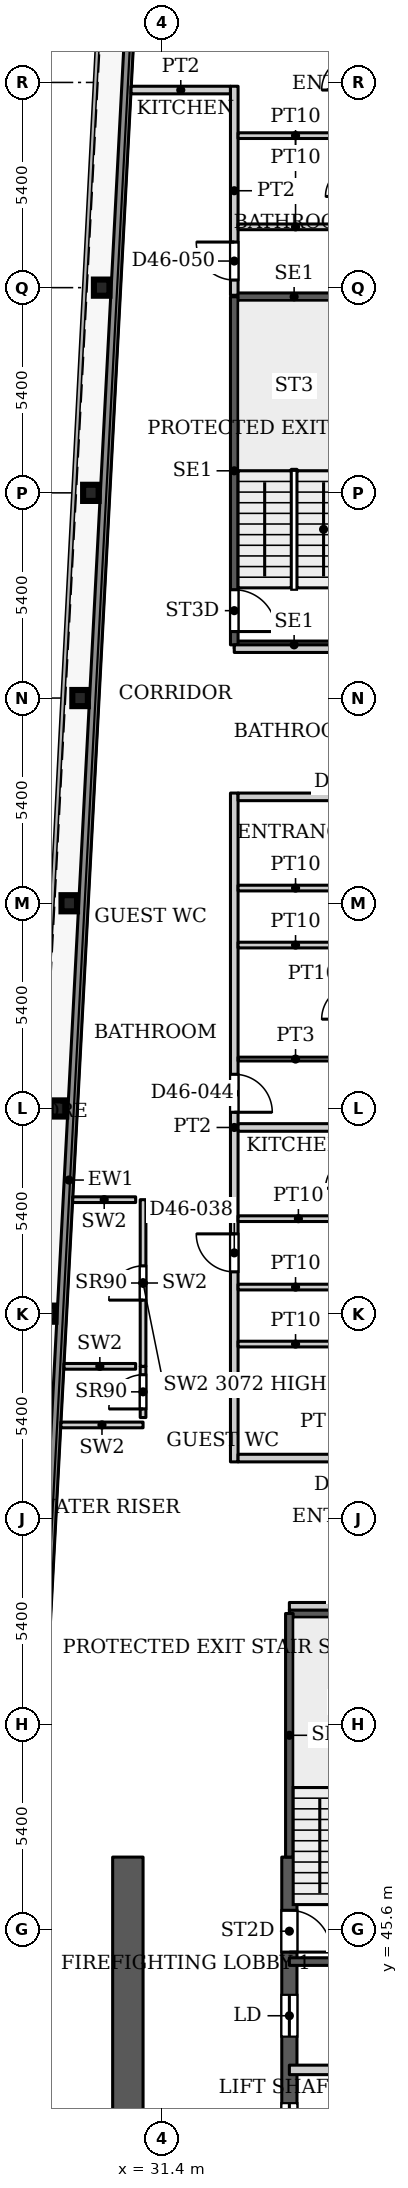
"""IFC4 building model, lengths in metres.
Left out: names, types, materials, properties, quantities, classifications, styles, units other than length and angle.
Written with IfcOpenShell. Run it as: python <this file> out.ifc"""

import sys

from ifc_helpers import new_model, si_unit, direction, frame, frame_2d, origin, origin_2d, place, context, subcontext, project, spatial, rectangle, i_section, extrude, source, transform, mapped, element, fill, save


model = new_model("IFC4")
c1 = context("Model", 3, precision=1e-05, world=origin(), true_north=direction((0.0, 1.0)))
c2 = subcontext(c1, "Body", "Model", "MODEL_VIEW")
j1 = project(units=[si_unit("LENGTHUNIT", "METRE"), si_unit("PLANEANGLEUNIT", "RADIAN")], contexts=[c1])
p1 = place(None, origin())
s1 = spatial("IfcSite", under=j1, at=p1, CompositionType="ELEMENT")
p2 = place(p1, origin())
s2 = spatial("IfcBuilding", under=s1, at=p2, CompositionType="ELEMENT")
p3 = place(p2, frame((0.0, 0.0, 199.4)))
s3 = spatial("IfcBuildingStorey", under=s2, at=p3, CompositionType="ELEMENT", Elevation=199.4)
for number, where, z_axis, x_axis in (
    (1, (28.39, 61.8, 0.0), (0.0, 0.0, 1.0), (1.0, 0.0, 0.0)),
    (2, (28.674, 67.2, 0.0), (0.0, 0.0, 1.0), (1.0, 0.0, 0.0)),
    (3, (28.958, 72.6, 0.0), (0.0, 0.0, 1.0), (1.0, 0.0, 0.0)),
    (4, (29.243, 78.0, 0.0), (0.0, 0.0, 1.0), (1.0, 0.0, 0.0)),
    (5, (29.527, 83.4, 0.0), (0.0, 0.0, 1.0), (1.0, 0.0, 0.0)),
    (6, (29.811, 88.8, 0.0), (0.0, 0.0, 1.0), (1.0, 0.0, 0.0)),
):
    element("IfcColumn", number, at=place(p3, frame(where, z_axis=z_axis, x_axis=x_axis)), inside=s3, PredefinedType="COLUMN", context=c2, shape_type="SweptSolid", body=[
        extrude(i_section(OverallWidth=0.409, OverallDepth=0.425, WebThickness=0.033, FlangeThickness=0.052, FilletRadius=0.013, at=origin_2d()), origin(), (0.0, 0.0, 1.0), 3.9),
    ])
p4 = place(p3, frame((34.75, 29.05, 0.0), z_axis=(0.0, 0.0, 1.0), x_axis=(0.0, 1.0, 0.0)))
e7 = element("IfcWall", 7, at=p4, inside=s3, PredefinedType="SHEAR", context=c2, shape_type="SweptSolid", body=[
    extrude(rectangle(XDim=18.45, YDim=0.4, at=frame_2d((9.225, 0.0))), origin(), (0.0, 0.0, 1.0), 3.9),
])
p5 = place(p4, frame((8.025, 0.0, 0.0)))
e8 = element("IfcOpeningElement", 8, at=p5, cuts=e7, PredefinedType="OPENING", context=c2, shape_type="SweptSolid", body=[
    extrude(rectangle(XDim=1.1, YDim=2.2, at=frame_2d((0.55, 1.1))), frame((0.0, 0.21, 0.0), z_axis=(0.0, -1.0, 0.0), x_axis=(1.0, 0.0, 0.0)), (0.0, 0.0, 1.0), 0.42),
])
p6 = place(p4, frame((10.875, 0.0, 0.0)))
e9 = element("IfcOpeningElement", 9, at=p6, cuts=e7, PredefinedType="OPENING", context=c2, shape_type="SweptSolid", body=[
    extrude(rectangle(XDim=1.1, YDim=2.2, at=frame_2d((0.55, 1.1))), frame((0.0, 0.21, 0.0), z_axis=(0.0, -1.0, 0.0), x_axis=(1.0, 0.0, 0.0)), (0.0, 0.0, 1.0), 0.42),
])
p7 = place(p4, frame((13.725, 0.0, 0.0)))
e10 = element("IfcOpeningElement", 10, at=p7, cuts=e7, PredefinedType="OPENING", context=c2, shape_type="SweptSolid", body=[
    extrude(rectangle(XDim=1.1, YDim=2.2, at=frame_2d((0.55, 1.1))), frame((0.0, 0.21, 0.0), z_axis=(0.0, -1.0, 0.0), x_axis=(1.0, 0.0, 0.0)), (0.0, 0.0, 1.0), 0.42),
])
p8 = place(p4, frame((15.95, 0.0, 0.0)))
e11 = element("IfcOpeningElement", 11, at=p8, cuts=e7, PredefinedType="OPENING", context=c2, shape_type="SweptSolid", body=[
    extrude(rectangle(XDim=1.1, YDim=2.2, at=frame_2d((0.55, 1.1))), frame((0.0, 0.21, 0.0), z_axis=(0.0, -1.0, 0.0), x_axis=(1.0, 0.0, 0.0)), (0.0, 0.0, 1.0), 0.42),
])
p9 = place(p3, frame((30.5, 29.05, 0.0), z_axis=(0.0, 0.0, 1.0), x_axis=(0.0, 1.0, 0.0)))
e12 = element("IfcWall", 12, at=p9, inside=s3, PredefinedType="SHEAR", context=c2, shape_type="SweptSolid", body=[
    extrude(rectangle(XDim=18.45, YDim=0.8, at=frame_2d((9.225, 0.0))), origin(), (0.0, 0.0, 1.0), 3.9),
])
p10 = place(p9, frame((1.5, 0.0, 0.0)))
e13 = element("IfcOpeningElement", 13, at=p10, cuts=e12, PredefinedType="OPENING", context=c2, shape_type="SweptSolid", body=[
    extrude(rectangle(XDim=0.9, YDim=2.2, at=frame_2d((0.45, 1.1))), frame((0.0, 0.41, 0.0), z_axis=(0.0, -1.0, 0.0), x_axis=(1.0, 0.0, 0.0)), (0.0, 0.0, 1.0), 0.82),
])
p11 = place(p9, frame((6.03, 0.0, 0.0)))
e14 = element("IfcOpeningElement", 14, at=p11, cuts=e12, PredefinedType="OPENING", context=c2, shape_type="SweptSolid", body=[
    extrude(rectangle(XDim=0.9, YDim=2.2, at=frame_2d((0.45, 1.1))), frame((0.0, 0.41, 0.0), z_axis=(0.0, -1.0, 0.0), x_axis=(1.0, 0.0, 0.0)), (0.0, 0.0, 1.0), 0.82),
])
p12 = place(p9, frame((9.7, 0.0, 0.0)))
e15 = element("IfcOpeningElement", 15, at=p12, cuts=e12, PredefinedType="OPENING", context=c2, shape_type="SweptSolid", body=[
    extrude(rectangle(XDim=0.9, YDim=2.2, at=frame_2d((0.45, 1.1))), frame((0.0, 0.41, 0.0), z_axis=(0.0, -1.0, 0.0), x_axis=(1.0, 0.0, 0.0)), (0.0, 0.0, 1.0), 0.82),
])
p13 = place(p3, frame((27.195, 31.969, 0.0), z_axis=(0.0, 0.0, 1.0), x_axis=(0.052554995867, 0.998618031286, 0.0)))
e16 = element("IfcWall", 16, at=p13, inside=s3, PredefinedType="SOLIDWALL", context=c2, shape_type="SweptSolid", body=[
    extrude(rectangle(XDim=66.787, YDim=0.25, at=frame_2d((33.394, 0.0))), origin(), (0.0, 0.0, 1.0), 3.75),
])
for number, where, z_axis, x_axis in (
    (17, (34.75, 44.75, 0.0), (0.0, 0.0, 1.0), (1.0, 0.0, 0.0)),
    (18, (34.75, 53.91, 0.0), (0.0, 0.0, 1.0), (1.0, 0.0, 0.0)),
):
    element("IfcWall", number, at=place(p3, frame(where, z_axis=z_axis, x_axis=x_axis)), inside=s3, PredefinedType="SHEAR", context=c2, shape_type="SweptSolid", body=[
        extrude(rectangle(XDim=3.15, YDim=0.2, at=frame_2d((1.575, 0.0))), origin(), (0.0, 0.0, 1.0), 3.9),
    ])
p14 = place(p3, frame((34.75, 47.5, 0.0), z_axis=(0.0, 0.0, 1.0), x_axis=(0.0, 1.0, 0.0)))
e19 = element("IfcWall", 19, at=p14, inside=s3, PredefinedType="SHEAR", context=c2, shape_type="SweptSolid", body=[
    extrude(rectangle(XDim=6.41, YDim=0.2, at=frame_2d((3.205, 0.0))), origin(), (0.0, 0.0, 1.0), 3.9),
])
for number, where, z_axis, x_axis in (
    (20, (33.3, 79.4, 0.0), (0.0, 0.0, 1.0), (1.0, 0.0, 0.0)),
    (21, (33.3, 88.56, 0.0), (0.0, 0.0, 1.0), (1.0, 0.0, 0.0)),
):
    element("IfcWall", number, at=place(p3, frame(where, z_axis=z_axis, x_axis=x_axis)), inside=s3, PredefinedType="SHEAR", context=c2, shape_type="SweptSolid", body=[
        extrude(rectangle(XDim=3.15, YDim=0.2, at=frame_2d((1.575, 0.0))), origin(), (0.0, 0.0, 1.0), 3.9),
    ])
p15 = place(p3, frame((33.3, 79.4, 0.0), z_axis=(0.0, 0.0, 1.0), x_axis=(0.0, 1.0, 0.0)))
e22 = element("IfcWall", 22, at=p15, inside=s3, PredefinedType="SHEAR", context=c2, shape_type="SweptSolid", body=[
    extrude(rectangle(XDim=9.16, YDim=0.2, at=frame_2d((4.58, 0.0))), origin(), (0.0, 0.0, 1.0), 3.9),
])
p16 = place(p15, frame((0.35, 0.0, 0.0)))
e23 = element("IfcOpeningElement", 23, at=p16, cuts=e22, PredefinedType="OPENING", context=c2, shape_type="SweptSolid", body=[
    extrude(rectangle(XDim=1.1, YDim=2.2, at=frame_2d((0.55, 1.1))), frame((0.0, 0.11, 0.0), z_axis=(0.0, -1.0, 0.0), x_axis=(1.0, 0.0, 0.0)), (0.0, 0.0, 1.0), 0.22),
])
p17 = place(p3, frame((34.75, 41.9, 0.0), z_axis=(0.0, 0.0, 1.0), x_axis=(1.0, 0.0, 0.0)))
e24 = element("IfcWall", 24, at=p17, inside=s3, PredefinedType="PARTITIONING", context=c2, shape_type="SweptSolid", body=[
    extrude(rectangle(XDim=3.25, YDim=0.25, at=frame_2d((1.625, 0.0))), origin(), (0.0, 0.0, 1.0), 3.9),
])
p18 = place(p3, frame((28.738, 58.872, 0.0), z_axis=(0.0, 0.0, 1.0), x_axis=(1.0, 0.0, 0.0)))
e25 = element("IfcWall", 25, at=p18, inside=s3, PredefinedType="PARTITIONING", context=c2, shape_type="SweptSolid", body=[
    extrude(rectangle(XDim=2.162, YDim=0.15, at=frame_2d((1.081, 0.0))), origin(), (0.0, 0.0, 1.0), 3.9),
])
p19 = place(p3, frame((30.9, 59.067, 0.0), z_axis=(0.0, 0.0, 1.0), x_axis=(0.0, 1.0, 0.0)))
e26 = element("IfcWall", 26, at=p19, inside=s3, PredefinedType="PARTITIONING", context=c2, shape_type="SweptSolid", body=[
    extrude(rectangle(XDim=1.347, YDim=0.15, at=frame_2d((0.674, 0.0))), origin(), (0.0, 0.0, 1.0), 3.9),
])
p20 = place(p19, frame((0.226, 0.0, 0.0)))
e27 = element("IfcOpeningElement", 27, at=p20, cuts=e26, PredefinedType="OPENING", context=c2, shape_type="SweptSolid", body=[
    extrude(rectangle(XDim=0.9, YDim=2.2, at=frame_2d((0.45, 1.1))), frame((0.0, 0.085, 0.0), z_axis=(0.0, -1.0, 0.0), x_axis=(1.0, 0.0, 0.0)), (0.0, 0.0, 1.0), 0.17),
])
p21 = place(p3, frame((28.82, 60.414, 0.0), z_axis=(0.0, 0.0, 1.0), x_axis=(1.0, 0.0, 0.0)))
e28 = element("IfcWall", 28, at=p21, inside=s3, PredefinedType="PARTITIONING", context=c2, shape_type="SweptSolid", body=[
    extrude(rectangle(XDim=1.885, YDim=0.15, at=frame_2d((0.942, 0.0))), origin(), (0.0, 0.0, 1.0), 3.9),
])
p22 = place(p3, frame((30.9, 60.414, 0.0), z_axis=(0.0, 0.0, 1.0), x_axis=(0.0, 1.0, 0.0)))
e29 = element("IfcWall", 29, at=p22, inside=s3, PredefinedType="PARTITIONING", context=c2, shape_type="SweptSolid", body=[
    extrude(rectangle(XDim=4.386, YDim=0.15, at=frame_2d((2.193, 0.0))), origin(), (0.0, 0.0, 1.0), 3.072),
])
p23 = place(p22, frame((1.743, 0.0, 0.0)))
e30 = element("IfcOpeningElement", 30, at=p23, cuts=e29, PredefinedType="OPENING", context=c2, shape_type="SweptSolid", body=[
    extrude(rectangle(XDim=0.9, YDim=2.2, at=frame_2d((0.45, 1.1))), frame((0.0, 0.085, 0.0), z_axis=(0.0, -1.0, 0.0), x_axis=(1.0, 0.0, 0.0)), (0.0, 0.0, 1.0), 0.17),
])
p24 = place(p3, frame((29.05, 64.8, 0.0), z_axis=(0.0, 0.0, 1.0), x_axis=(1.0, 0.0, 0.0)))
e31 = element("IfcWall", 31, at=p24, inside=s3, PredefinedType="PARTITIONING", context=c2, shape_type="SweptSolid", body=[
    extrude(rectangle(XDim=1.655, YDim=0.15, at=frame_2d((0.828, 0.0))), origin(), (0.0, 0.0, 1.0), 3.9),
])
p25 = place(p3, frame((30.585, 94.0, 0.0), z_axis=(0.0, 0.0, 1.0), x_axis=(1.0, 0.0, 0.0)))
e32 = element("IfcWall", 32, at=p25, inside=s3, PredefinedType="PARTITIONING", context=c2, shape_type="SweptSolid", body=[
    extrude(rectangle(XDim=2.615, YDim=0.2, at=frame_2d((1.308, 0.0))), origin(), (0.0, 0.0, 1.0), 3.6),
])
p26 = place(p3, frame((33.3, 57.9, 0.0), z_axis=(0.0, 0.0, 1.0), x_axis=(0.0, 1.0, 0.0)))
e33 = element("IfcWall", 33, at=p26, inside=s3, PredefinedType="PARTITIONING", context=c2, shape_type="SweptSolid", body=[
    extrude(rectangle(XDim=17.6, YDim=0.2, at=frame_2d((8.8, 0.0))), origin(), (0.0, 0.0, 1.0), 3.6),
])
p27 = place(p26, frame((5.0, 0.0, 0.0)))
e34 = element("IfcOpeningElement", 34, at=p27, cuts=e33, PredefinedType="OPENING", context=c2, shape_type="SweptSolid", body=[
    extrude(rectangle(XDim=1.0, YDim=2.1, at=frame_2d((0.5, 1.05))), frame((0.0, 0.11, 0.0), z_axis=(0.0, -1.0, 0.0), x_axis=(1.0, 0.0, 0.0)), (0.0, 0.0, 1.0), 0.22),
])
p28 = place(p26, frame((9.2, 0.0, 0.0)))
e35 = element("IfcOpeningElement", 35, at=p28, cuts=e33, PredefinedType="OPENING", context=c2, shape_type="SweptSolid", body=[
    extrude(rectangle(XDim=1.0, YDim=2.1, at=frame_2d((0.5, 1.05))), frame((0.0, 0.11, 0.0), z_axis=(0.0, -1.0, 0.0), x_axis=(1.0, 0.0, 0.0)), (0.0, 0.0, 1.0), 0.22),
])
p29 = place(p3, frame((33.3, 79.3, 0.0), z_axis=(0.0, 0.0, 1.0), x_axis=(1.0, 0.0, 0.0)))
e36 = element("IfcWall", 36, at=p29, inside=s3, PredefinedType="PARTITIONING", context=c2, shape_type="SweptSolid", body=[
    extrude(rectangle(XDim=12.6, YDim=0.2, at=frame_2d((6.3, 0.0))), origin(), (0.0, 0.0, 1.0), 3.6),
])
p30 = place(p29, frame((5.795, 0.0, 0.0)))
e37 = element("IfcOpeningElement", 37, at=p30, cuts=e36, PredefinedType="OPENING", context=c2, shape_type="SweptSolid", body=[
    extrude(rectangle(XDim=1.0, YDim=2.1, at=frame_2d((0.5, 1.05))), frame((0.0, 0.11, 0.0), z_axis=(0.0, -1.0, 0.0), x_axis=(1.0, 0.0, 0.0)), (0.0, 0.0, 1.0), 0.22),
])
p31 = place(p3, frame((33.3, 88.6, 0.0), z_axis=(0.0, 0.0, 1.0), x_axis=(0.0, 1.0, 0.0)))
e38 = element("IfcWall", 38, at=p31, inside=s3, PredefinedType="PARTITIONING", context=c2, shape_type="SweptSolid", body=[
    extrude(rectangle(XDim=5.5, YDim=0.2, at=frame_2d((2.75, 0.0))), origin(), (0.0, 0.0, 1.0), 3.6),
])
p32 = place(p31, frame((0.4, 0.0, 0.0)))
e39 = element("IfcOpeningElement", 39, at=p32, cuts=e38, PredefinedType="OPENING", context=c2, shape_type="SweptSolid", body=[
    extrude(rectangle(XDim=1.0, YDim=2.1, at=frame_2d((0.5, 1.05))), frame((0.0, 0.11, 0.0), z_axis=(0.0, -1.0, 0.0), x_axis=(1.0, 0.0, 0.0)), (0.0, 0.0, 1.0), 0.22),
])
p33 = place(p3, frame((33.4, 58.0, 0.0), z_axis=(0.0, 0.0, 1.0), x_axis=(1.0, 0.0, 0.0)))
e40 = element("IfcWall", 40, at=p33, inside=s3, PredefinedType="PARTITIONING", context=c2, shape_type="SweptSolid", body=[
    extrude(rectangle(XDim=12.5, YDim=0.2, at=frame_2d((6.25, 0.0))), origin(), (0.0, 0.0, 1.0), 3.6),
])
for number, where, z_axis, x_axis in (
    (41, (33.4, 61.0, 0.0), (0.0, 0.0, 1.0), (1.0, 0.0, 0.0)),
    (42, (33.4, 62.5, 0.0), (0.0, 0.0, 1.0), (1.0, 0.0, 0.0)),
):
    element("IfcWall", number, at=place(p3, frame(where, z_axis=z_axis, x_axis=x_axis)), inside=s3, PredefinedType="PARTITIONING", context=c2, shape_type="SweptSolid", body=[
        extrude(rectangle(XDim=3.025, YDim=0.15, at=frame_2d((1.513, 0.0))), origin(), (0.0, 0.0, 1.0), 3.6),
    ])
p34 = place(p3, frame((33.4, 64.3, 0.0), z_axis=(0.0, 0.0, 1.0), x_axis=(1.0, 0.0, 0.0)))
e43 = element("IfcWall", 43, at=p34, inside=s3, PredefinedType="PARTITIONING", context=c2, shape_type="SweptSolid", body=[
    extrude(rectangle(XDim=3.175, YDim=0.15, at=frame_2d((1.587, 0.0))), origin(), (0.0, 0.0, 1.0), 3.6),
])
p35 = place(p3, frame((33.4, 66.7, 0.0), z_axis=(0.0, 0.0, 1.0), x_axis=(1.0, 0.0, 0.0)))
e44 = element("IfcWall", 44, at=p35, inside=s3, PredefinedType="PARTITIONING", context=c2, shape_type="SweptSolid", body=[
    extrude(rectangle(XDim=12.5, YDim=0.2, at=frame_2d((6.25, 0.0))), origin(), (0.0, 0.0, 1.0), 3.6),
])
p36 = place(p3, frame((33.4, 68.5, 0.0), z_axis=(0.0, 0.0, 1.0), x_axis=(1.0, 0.0, 0.0)))
e45 = element("IfcWall", 45, at=p36, inside=s3, PredefinedType="PARTITIONING", context=c2, shape_type="SweptSolid", body=[
    extrude(rectangle(XDim=3.025, YDim=0.1, at=frame_2d((1.513, 0.0))), origin(), (0.0, 0.0, 1.0), 3.6),
])
for number, where, z_axis, x_axis in (
    (46, (33.4, 71.5, 0.0), (0.0, 0.0, 1.0), (1.0, 0.0, 0.0)),
    (47, (33.4, 73.0, 0.0), (0.0, 0.0, 1.0), (1.0, 0.0, 0.0)),
):
    element("IfcWall", number, at=place(p3, frame(where, z_axis=z_axis, x_axis=x_axis)), inside=s3, PredefinedType="PARTITIONING", context=c2, shape_type="SweptSolid", body=[
        extrude(rectangle(XDim=3.025, YDim=0.15, at=frame_2d((1.513, 0.0))), origin(), (0.0, 0.0, 1.0), 3.6),
    ])
p37 = place(p3, frame((33.4, 75.4, 0.0), z_axis=(0.0, 0.0, 1.0), x_axis=(1.0, 0.0, 0.0)))
e48 = element("IfcWall", 48, at=p37, inside=s3, PredefinedType="PARTITIONING", context=c2, shape_type="SweptSolid", body=[
    extrude(rectangle(XDim=12.5, YDim=0.2, at=frame_2d((6.25, 0.0))), origin(), (0.0, 0.0, 1.0), 3.6),
])
for number, where, z_axis, x_axis in (
    (49, (33.4, 90.4, 0.0), (0.0, 0.0, 1.0), (1.0, 0.0, 0.0)),
    (50, (33.4, 92.8, 0.0), (0.0, 0.0, 1.0), (1.0, 0.0, 0.0)),
):
    element("IfcWall", number, at=place(p3, frame(where, z_axis=z_axis, x_axis=x_axis)), inside=s3, PredefinedType="PARTITIONING", context=c2, shape_type="SweptSolid", body=[
        extrude(rectangle(XDim=3.025, YDim=0.15, at=frame_2d((1.513, 0.0))), origin(), (0.0, 0.0, 1.0), 3.6),
    ])
p38 = place(p3, frame((34.75, 54.1, 0.0), z_axis=(0.0, 0.0, 1.0), x_axis=(1.0, 0.0, 0.0)))
e51 = element("IfcWall", 51, at=p38, inside=s3, PredefinedType="PARTITIONING", context=c2, shape_type="SweptSolid", body=[
    extrude(rectangle(XDim=11.15, YDim=0.2, at=frame_2d((5.575, 0.0))), origin(), (0.0, 0.0, 1.0), 3.6),
])
p39 = place(p38, frame((5.075, 0.0, 0.0)))
e52 = element("IfcOpeningElement", 52, at=p39, cuts=e51, PredefinedType="OPENING", context=c2, shape_type="SweptSolid", body=[
    extrude(rectangle(XDim=1.0, YDim=2.1, at=frame_2d((0.5, 1.05))), frame((0.0, 0.11, 0.0), z_axis=(0.0, -1.0, 0.0), x_axis=(1.0, 0.0, 0.0)), (0.0, 0.0, 1.0), 0.22),
])
m1 = source(origin(), c2, "Body", "SweptSolid", [
    extrude(rectangle(XDim=1.1, YDim=2.2, at=frame_2d((0.55, 1.1))), frame((0.0, 0.025, 0.0), z_axis=(0.0, -1.0, 0.0), x_axis=(1.0, 0.0, 0.0)), (0.0, 0.0, 1.0), 0.05),
])
p40 = place(p6, origin())
e53 = element("IfcDoor", 53, at=p40, inside=s3, OperationType="SLIDING_TO_LEFT", PredefinedType="DOOR", context=c2, shape_type="MappedRepresentation", body=[
    mapped(m1, transform((0.0, 0.0, 0.0), x_axis=(1.0, 0.0, 0.0), y_axis=(0.0, 1.0, 0.0), z_axis=(0.0, 0.0, 1.0), scale=1.0)),
])
fill(e9, e53)
p41 = place(p7, origin())
e54 = element("IfcDoor", 54, at=p41, inside=s3, OperationType="SLIDING_TO_LEFT", PredefinedType="DOOR", context=c2, shape_type="MappedRepresentation", body=[
    mapped(m1, transform((0.0, 0.0, 0.0), x_axis=(1.0, 0.0, 0.0), y_axis=(0.0, 1.0, 0.0), z_axis=(0.0, 0.0, 1.0), scale=1.0)),
])
fill(e10, e54)
m2 = source(origin(), c2, "Body", "SweptSolid", [
    extrude(rectangle(XDim=0.9, YDim=2.2, at=frame_2d((0.45, 1.1))), frame((0.0, 0.025, 0.0), z_axis=(0.0, -1.0, 0.0), x_axis=(1.0, 0.0, 0.0)), (0.0, 0.0, 1.0), 0.05),
])
p42 = place(p20, origin())
e55 = element("IfcDoor", 55, at=p42, inside=s3, OperationType="SINGLE_SWING_LEFT", PredefinedType="DOOR", context=c2, shape_type="MappedRepresentation", body=[
    mapped(m2, transform((0.0, 0.0, 0.0), x_axis=(1.0, 0.0, 0.0), y_axis=(0.0, 1.0, 0.0), z_axis=(0.0, 0.0, 1.0), scale=1.0)),
])
fill(e27, e55)
p43 = place(p23, origin())
e56 = element("IfcDoor", 56, at=p43, inside=s3, OperationType="SINGLE_SWING_LEFT", PredefinedType="DOOR", context=c2, shape_type="MappedRepresentation", body=[
    mapped(m2, transform((0.0, 0.0, 0.0), x_axis=(1.0, 0.0, 0.0), y_axis=(0.0, 1.0, 0.0), z_axis=(0.0, 0.0, 1.0), scale=1.0)),
])
fill(e30, e56)
m3 = source(origin(), c2, "Body", "SweptSolid", [
    extrude(rectangle(XDim=1.1, YDim=2.2, at=frame_2d((0.55, 1.1))), frame((0.0, 0.025, 0.0), z_axis=(0.0, -1.0, 0.0), x_axis=(1.0, 0.0, 0.0)), (0.0, 0.0, 1.0), 0.05),
])
p44 = place(p8, origin())
e57 = element("IfcDoor", 57, at=p44, inside=s3, OperationType="SINGLE_SWING_RIGHT", PredefinedType="DOOR", context=c2, shape_type="MappedRepresentation", body=[
    mapped(m3, transform((0.0, 0.0, 0.0), x_axis=(1.0, 0.0, 0.0), y_axis=(0.0, 1.0, 0.0), z_axis=(0.0, 0.0, 1.0), scale=1.0)),
])
fill(e11, e57)
p45 = place(p16, origin())
e58 = element("IfcDoor", 58, at=p45, inside=s3, OperationType="SINGLE_SWING_RIGHT", PredefinedType="DOOR", context=c2, shape_type="MappedRepresentation", body=[
    mapped(m3, transform((0.0, 0.0, 0.0), x_axis=(1.0, 0.0, 0.0), y_axis=(0.0, 1.0, 0.0), z_axis=(0.0, 0.0, 1.0), scale=1.0)),
])
fill(e23, e58)
m4 = source(origin(), c2, "Body", "SweptSolid", [
    extrude(rectangle(XDim=1.0, YDim=2.1, at=frame_2d((0.5, 1.05))), frame((0.0, 0.025, 0.0), z_axis=(0.0, -1.0, 0.0), x_axis=(1.0, 0.0, 0.0)), (0.0, 0.0, 1.0), 0.05),
])
p46 = place(p27, origin())
e59 = element("IfcDoor", 59, at=p46, inside=s3, OperationType="SINGLE_SWING_LEFT", PredefinedType="DOOR", context=c2, shape_type="MappedRepresentation", body=[
    mapped(m4, transform((0.0, 0.0, 0.0), x_axis=(1.0, 0.0, 0.0), y_axis=(0.0, 1.0, 0.0), z_axis=(0.0, 0.0, 1.0), scale=1.0)),
])
fill(e34, e59)
p47 = place(p28, origin())
e60 = element("IfcDoor", 60, at=p47, inside=s3, OperationType="SINGLE_SWING_RIGHT", PredefinedType="DOOR", context=c2, shape_type="MappedRepresentation", body=[
    mapped(m4, transform((0.0, 0.0, 0.0), x_axis=(1.0, 0.0, 0.0), y_axis=(0.0, 1.0, 0.0), z_axis=(0.0, 0.0, 1.0), scale=1.0)),
])
fill(e35, e60)
p48 = place(p32, origin())
e61 = element("IfcDoor", 61, at=p48, inside=s3, OperationType="SINGLE_SWING_LEFT", PredefinedType="DOOR", context=c2, shape_type="MappedRepresentation", body=[
    mapped(m4, transform((0.0, 0.0, 0.0), x_axis=(1.0, 0.0, 0.0), y_axis=(0.0, 1.0, 0.0), z_axis=(0.0, 0.0, 1.0), scale=1.0)),
])
fill(e39, e61)
save(model, sys.argv[1])
